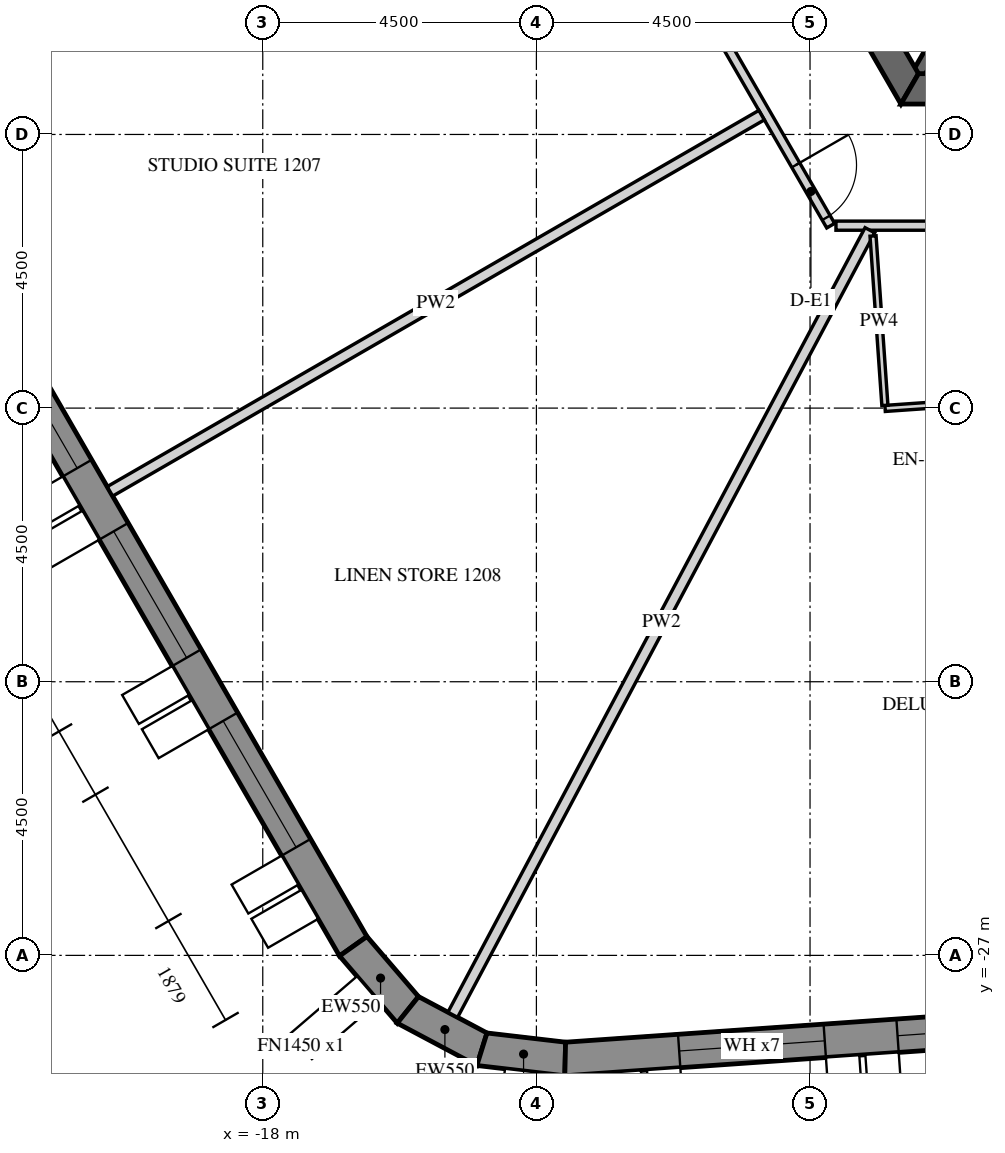
"""IFC4 building model, lengths in metres.
Left out: names, types, materials, properties, quantities, classifications, styles, units other than length and angle.
Written with IfcOpenShell. Run it as: python <this file> out.ifc"""

import sys

from ifc_helpers import new_model, si_unit, direction, frame, frame_2d, origin, place, context, subcontext, project, spatial, polyline, rectangle, outline, extrude, element, fill, save


model = new_model("IFC4")
c1 = context("Model", 3, precision=1e-05, world=origin(), true_north=direction((0.0, 1.0)))
c2 = subcontext(c1, "Body", "Model", "MODEL_VIEW")
j1 = project(units=[si_unit("LENGTHUNIT", "METRE"), si_unit("PLANEANGLEUNIT", "RADIAN")], contexts=[c1])
p1 = place(None, origin())
s1 = spatial("IfcSite", under=j1, at=p1, CompositionType="ELEMENT")
p2 = place(p1, origin())
s2 = spatial("IfcBuilding", under=s1, at=p2, CompositionType="ELEMENT")
p3 = place(p2, frame((0.0, 0.0, 164.4)))
s3 = spatial("IfcBuildingStorey", under=s2, at=p3, CompositionType="ELEMENT", Elevation=164.4)
p4 = place(p3, frame((-30.391, -2.811, -0.15), z_axis=(0.0, 0.0, 1.0), x_axis=(0.499998569178, -0.866026229868, 0.0)))
e1 = element("IfcWall", 1, at=p4, inside=s3, PredefinedType="SOLIDWALL", context=c2, shape_type="SweptSolid", body=[
    extrude(outline(polyline([(-0.022, -0.275), (27.783, -0.275), (27.732, 0.275), (0.022, 0.275), (-0.022, -0.275)])), origin(), (0.0, 0.0, 1.0), 3.9),
])
p5 = place(p4, frame((1.879, 0.0, 1.05)))
e2 = element("IfcOpeningElement", 2, at=p5, cuts=e1, PredefinedType="OPENING", context=c2, shape_type="SweptSolid", body=[
    extrude(rectangle(XDim=2.4, YDim=2.4, at=frame_2d((1.2, 1.2))), frame((0.0, 0.285, 0.0), z_axis=(0.0, -1.0, 0.0), x_axis=(1.0, 0.0, 0.0)), (0.0, 0.0, 1.0), 0.57),
])
p6 = place(p4, frame((5.479, 0.0, 1.05)))
e3 = element("IfcOpeningElement", 3, at=p6, cuts=e1, PredefinedType="OPENING", context=c2, shape_type="SweptSolid", body=[
    extrude(rectangle(XDim=2.4, YDim=2.4, at=frame_2d((1.2, 1.2))), frame((0.0, 0.285, 0.0), z_axis=(0.0, -1.0, 0.0), x_axis=(1.0, 0.0, 0.0)), (0.0, 0.0, 1.0), 0.57),
])
p7 = place(p4, frame((9.079, 0.0, 1.05)))
e4 = element("IfcOpeningElement", 4, at=p7, cuts=e1, PredefinedType="OPENING", context=c2, shape_type="SweptSolid", body=[
    extrude(rectangle(XDim=2.4, YDim=2.4, at=frame_2d((1.2, 1.2))), frame((0.0, 0.285, 0.0), z_axis=(0.0, -1.0, 0.0), x_axis=(1.0, 0.0, 0.0)), (0.0, 0.0, 1.0), 0.57),
])
p8 = place(p4, frame((12.679, 0.0, 1.05)))
e5 = element("IfcOpeningElement", 5, at=p8, cuts=e1, PredefinedType="OPENING", context=c2, shape_type="SweptSolid", body=[
    extrude(rectangle(XDim=2.4, YDim=2.4, at=frame_2d((1.2, 1.2))), frame((0.0, 0.285, 0.0), z_axis=(0.0, -1.0, 0.0), x_axis=(1.0, 0.0, 0.0)), (0.0, 0.0, 1.0), 0.57),
])
p9 = place(p4, frame((16.279, 0.0, 1.05)))
e6 = element("IfcOpeningElement", 6, at=p9, cuts=e1, PredefinedType="OPENING", context=c2, shape_type="SweptSolid", body=[
    extrude(rectangle(XDim=2.4, YDim=2.4, at=frame_2d((1.2, 1.2))), frame((0.0, 0.285, 0.0), z_axis=(0.0, -1.0, 0.0), x_axis=(1.0, 0.0, 0.0)), (0.0, 0.0, 1.0), 0.57),
])
p10 = place(p4, frame((19.879, 0.0, 1.05)))
e7 = element("IfcOpeningElement", 7, at=p10, cuts=e1, PredefinedType="OPENING", context=c2, shape_type="SweptSolid", body=[
    extrude(rectangle(XDim=2.4, YDim=2.4, at=frame_2d((1.2, 1.2))), frame((0.0, 0.285, 0.0), z_axis=(0.0, -1.0, 0.0), x_axis=(1.0, 0.0, 0.0)), (0.0, 0.0, 1.0), 0.57),
])
p11 = place(p4, frame((23.479, 0.0, 1.05)))
e8 = element("IfcOpeningElement", 8, at=p11, cuts=e1, PredefinedType="OPENING", context=c2, shape_type="SweptSolid", body=[
    extrude(rectangle(XDim=2.4, YDim=2.4, at=frame_2d((1.2, 1.2))), frame((0.0, 0.285, 0.0), z_axis=(0.0, -1.0, 0.0), x_axis=(1.0, 0.0, 0.0)), (0.0, 0.0, 1.0), 0.57),
])
p12 = place(p3, frame((-16.512, -26.85, -0.15), z_axis=(0.0, 0.0, 1.0), x_axis=(0.651621950847, -0.758543890078, 0.0)))
e9 = element("IfcWall", 9, at=p12, inside=s3, PredefinedType="SOLIDWALL", context=c2, shape_type="SweptSolid", body=[
    extrude(outline(polyline([(-0.026, -0.275), (1.431, -0.275), (1.327, 0.275), (0.026, 0.275), (-0.026, -0.275)])), origin(), (0.0, 0.0, 1.0), 3.9),
])
p13 = place(p3, frame((-15.614, -27.896, -0.15), z_axis=(0.0, 0.0, 1.0), x_axis=(0.882994189209, -0.469383917304, 0.0)))
e10 = element("IfcWall", 10, at=p13, inside=s3, PredefinedType="SOLIDWALL", context=c2, shape_type="SweptSolid", body=[
    extrude(outline(polyline([(-0.052, -0.275), (1.431, -0.275), (1.327, 0.275), (0.052, 0.275), (-0.052, -0.275)])), origin(), (0.0, 0.0, 1.0), 3.9),
])
p14 = place(p3, frame((-14.396, -28.543, -0.15), z_axis=(0.0, 0.0, 1.0), x_axis=(0.993232537394, -0.11614269956, 0.0)))
e11 = element("IfcWall", 11, at=p14, inside=s3, PredefinedType="SOLIDWALL", context=c2, shape_type="SweptSolid", body=[
    extrude(outline(polyline([(-0.052, -0.275), (1.405, -0.275), (1.353, 0.275), (0.052, 0.275), (-0.052, -0.275)])), origin(), (0.0, 0.0, 1.0), 3.9),
])
p15 = place(p3, frame((-13.026, -28.704, -0.15), z_axis=(0.0, 0.0, 1.0), x_axis=(0.99756406806, 0.069756219185, 0.0)))
e12 = element("IfcWall", 12, at=p15, inside=s3, PredefinedType="SOLIDWALL", context=c2, shape_type="SweptSolid", body=[
    extrude(outline(polyline([(-0.026, -0.275), (27.78, -0.275), (27.735, 0.275), (0.026, 0.275), (-0.026, -0.275)])), origin(), (0.0, 0.0, 1.0), 3.9),
])
p16 = place(p15, frame((1.879, 0.0, 1.05)))
e13 = element("IfcOpeningElement", 13, at=p16, cuts=e12, PredefinedType="OPENING", context=c2, shape_type="SweptSolid", body=[
    extrude(rectangle(XDim=2.4, YDim=2.4, at=frame_2d((1.2, 1.2))), frame((0.0, 0.285, 0.0), z_axis=(0.0, -1.0, 0.0), x_axis=(1.0, 0.0, 0.0)), (0.0, 0.0, 1.0), 0.57),
])
p17 = place(p15, frame((5.479, 0.0, 1.05)))
e14 = element("IfcOpeningElement", 14, at=p17, cuts=e12, PredefinedType="OPENING", context=c2, shape_type="SweptSolid", body=[
    extrude(rectangle(XDim=2.4, YDim=2.4, at=frame_2d((1.2, 1.2))), frame((0.0, 0.285, 0.0), z_axis=(0.0, -1.0, 0.0), x_axis=(1.0, 0.0, 0.0)), (0.0, 0.0, 1.0), 0.57),
])
p18 = place(p15, frame((9.079, 0.0, 1.05)))
e15 = element("IfcOpeningElement", 15, at=p18, cuts=e12, PredefinedType="OPENING", context=c2, shape_type="SweptSolid", body=[
    extrude(rectangle(XDim=2.4, YDim=2.4, at=frame_2d((1.2, 1.2))), frame((0.0, 0.285, 0.0), z_axis=(0.0, -1.0, 0.0), x_axis=(1.0, 0.0, 0.0)), (0.0, 0.0, 1.0), 0.57),
])
p19 = place(p15, frame((12.679, 0.0, 1.05)))
e16 = element("IfcOpeningElement", 16, at=p19, cuts=e12, PredefinedType="OPENING", context=c2, shape_type="SweptSolid", body=[
    extrude(rectangle(XDim=2.4, YDim=2.4, at=frame_2d((1.2, 1.2))), frame((0.0, 0.285, 0.0), z_axis=(0.0, -1.0, 0.0), x_axis=(1.0, 0.0, 0.0)), (0.0, 0.0, 1.0), 0.57),
])
p20 = place(p15, frame((16.279, 0.0, 1.05)))
e17 = element("IfcOpeningElement", 17, at=p20, cuts=e12, PredefinedType="OPENING", context=c2, shape_type="SweptSolid", body=[
    extrude(rectangle(XDim=2.4, YDim=2.4, at=frame_2d((1.2, 1.2))), frame((0.0, 0.285, 0.0), z_axis=(0.0, -1.0, 0.0), x_axis=(1.0, 0.0, 0.0)), (0.0, 0.0, 1.0), 0.57),
])
p21 = place(p15, frame((19.879, 0.0, 1.05)))
e18 = element("IfcOpeningElement", 18, at=p21, cuts=e12, PredefinedType="OPENING", context=c2, shape_type="SweptSolid", body=[
    extrude(rectangle(XDim=2.4, YDim=2.4, at=frame_2d((1.2, 1.2))), frame((0.0, 0.285, 0.0), z_axis=(0.0, -1.0, 0.0), x_axis=(1.0, 0.0, 0.0)), (0.0, 0.0, 1.0), 0.57),
])
p22 = place(p15, frame((23.479, 0.0, 1.05)))
e19 = element("IfcOpeningElement", 19, at=p22, cuts=e12, PredefinedType="OPENING", context=c2, shape_type="SweptSolid", body=[
    extrude(rectangle(XDim=2.4, YDim=2.4, at=frame_2d((1.2, 1.2))), frame((0.0, 0.285, 0.0), z_axis=(0.0, -1.0, 0.0), x_axis=(1.0, 0.0, 0.0)), (0.0, 0.0, 1.0), 0.57),
])
p23 = place(p3, frame((-14.722, 0.0, -0.15), z_axis=(0.0, 0.0, 1.0), x_axis=(0.50000571537, -0.866022103989, 0.0)))
e20 = element("IfcWall", 20, at=p23, inside=s3, PredefinedType="SHEAR", context=c2, shape_type="SweptSolid", body=[
    extrude(outline(polyline([(-0.144, -0.25), (14.867, -0.25), (14.578, 0.25), (0.144, 0.25), (-0.144, -0.25)])), origin(), (0.0, 0.0, 1.0), 3.9),
])
p24 = place(p23, frame((6.432, 0.0, 0.15)))
e21 = element("IfcOpeningElement", 21, at=p24, cuts=e20, PredefinedType="OPENING", context=c2, shape_type="SweptSolid", body=[
    extrude(rectangle(XDim=1.8, YDim=2.4, at=frame_2d((0.9, 1.2))), frame((0.0, 0.26, 0.0), z_axis=(0.0, -1.0, 0.0), x_axis=(1.0, 0.0, 0.0)), (0.0, 0.0, 1.0), 0.52),
])
p25 = place(p3, frame((-7.361, -12.75, -0.15), z_axis=(0.0, 0.0, 1.0), x_axis=(1.0, 0.0, 0.0)))
e22 = element("IfcWall", 22, at=p25, inside=s3, PredefinedType="SHEAR", context=c2, shape_type="SweptSolid", body=[
    extrude(outline(polyline([(-0.144, -0.25), (14.866, -0.25), (14.578, 0.25), (0.144, 0.25), (-0.144, -0.25)])), origin(), (0.0, 0.0, 1.0), 3.9),
])
p26 = place(p25, frame((6.761, 0.0, 0.15)))
e23 = element("IfcOpeningElement", 23, at=p26, cuts=e22, PredefinedType="OPENING", context=c2, shape_type="SweptSolid", body=[
    extrude(rectangle(XDim=1.2, YDim=2.4, at=frame_2d((0.6, 1.2))), frame((0.0, 0.26, 0.0), z_axis=(0.0, -1.0, 0.0), x_axis=(1.0, 0.0, 0.0)), (0.0, 0.0, 1.0), 0.52),
])
p27 = place(p3, frame((-5.773, -10.0, -0.15), z_axis=(0.0, 0.0, 1.0), x_axis=(-0.499995765644, -0.866027848477, 0.0)))
e24 = element("IfcWall", 24, at=p27, inside=s3, PredefinedType="SHEAR", context=c2, shape_type="SweptSolid", body=[
    extrude(rectangle(XDim=2.887, YDim=0.2, at=frame_2d((1.443, 0.0))), origin(), (0.0, 0.0, 1.0), 3.9),
])
p28 = place(p3, frame((-16.094, -2.125, 0.0), z_axis=(0.0, 0.0, 1.0), x_axis=(0.500010545262, -0.866019315389, 0.0)))
e25 = element("IfcWall", 25, at=p28, inside=s3, PredefinedType="PARTITIONING", context=c2, shape_type="SweptSolid", body=[
    extrude(rectangle(XDim=14.867, YDim=0.15, at=frame_2d((7.434, 0.0))), origin(), (0.0, 0.0, 1.0), 2.988),
])
p29 = place(p28, frame((3.619, 0.0, 0.0)))
e26 = element("IfcOpeningElement", 26, at=p29, cuts=e25, PredefinedType="OPENING", context=c2, shape_type="SweptSolid", body=[
    extrude(rectangle(XDim=1.0, YDim=2.1, at=frame_2d((0.5, 1.05))), frame((0.0, 0.085, 0.0), z_axis=(0.0, -1.0, 0.0), x_axis=(1.0, 0.0, 0.0)), (0.0, 0.0, 1.0), 0.17),
])
p30 = place(p28, frame((9.924, 0.0, 0.0)))
e27 = element("IfcOpeningElement", 27, at=p30, cuts=e25, PredefinedType="OPENING", context=c2, shape_type="SweptSolid", body=[
    extrude(rectangle(XDim=1.0, YDim=2.1, at=frame_2d((0.5, 1.05))), frame((0.0, 0.085, 0.0), z_axis=(0.0, -1.0, 0.0), x_axis=(1.0, 0.0, 0.0)), (0.0, 0.0, 1.0), 0.17),
])
p31 = place(p28, frame((13.717, 0.0, 0.0)))
e28 = element("IfcOpeningElement", 28, at=p31, cuts=e25, PredefinedType="OPENING", context=c2, shape_type="SweptSolid", body=[
    extrude(rectangle(XDim=1.0, YDim=2.1, at=frame_2d((0.5, 1.05))), frame((0.0, 0.085, 0.0), z_axis=(0.0, -1.0, 0.0), x_axis=(1.0, 0.0, 0.0)), (0.0, 0.0, 1.0), 0.17),
])
p32 = place(p3, frame((-8.574, -15.0, 0.0), z_axis=(0.0, 0.0, 1.0), x_axis=(1.0, 0.0, 0.0)))
e29 = element("IfcWall", 29, at=p32, inside=s3, PredefinedType="PARTITIONING", context=c2, shape_type="SweptSolid", body=[
    extrude(rectangle(XDim=14.78, YDim=0.15, at=frame_2d((7.39, 0.0))), origin(), (0.0, 0.0, 1.0), 2.988),
])
p33 = place(p32, frame((4.445, 0.0, 0.0)))
e30 = element("IfcOpeningElement", 30, at=p33, cuts=e29, PredefinedType="OPENING", context=c2, shape_type="SweptSolid", body=[
    extrude(rectangle(XDim=1.0, YDim=2.1, at=frame_2d((0.5, 1.05))), frame((0.0, 0.085, 0.0), z_axis=(0.0, -1.0, 0.0), x_axis=(1.0, 0.0, 0.0)), (0.0, 0.0, 1.0), 0.17),
])
p34 = place(p32, frame((8.885, 0.0, 0.0)))
e31 = element("IfcOpeningElement", 31, at=p34, cuts=e29, PredefinedType="OPENING", context=c2, shape_type="SweptSolid", body=[
    extrude(rectangle(XDim=1.0, YDim=2.1, at=frame_2d((0.5, 1.05))), frame((0.0, 0.085, 0.0), z_axis=(0.0, -1.0, 0.0), x_axis=(1.0, 0.0, 0.0)), (0.0, 0.0, 1.0), 0.17),
])
for number, where, z_axis, x_axis in (
    (32, (-24.114, -13.134, 0.0), (0.0, 0.0, 1.0), (0.866, 0.5, 0.0)),
    (33, (-20.513, -19.37, 0.0), (0.0, 0.0, 1.0), (0.866, 0.5, 0.0)),
):
    element("IfcWall", number, at=place(p3, frame(where, z_axis=z_axis, x_axis=x_axis)), inside=s3, PredefinedType="PARTITIONING", context=c2, shape_type="SweptSolid", body=[
        extrude(rectangle(XDim=12.375, YDim=0.18, at=frame_2d((6.188, 0.0))), origin(), (0.0, 0.0, 1.0), 2.988),
    ])
p35 = place(p3, frame((-14.876, -27.977, 0.0), z_axis=(0.0, 0.0, 1.0), x_axis=(0.469468328163, 0.882949312731, 0.0)))
e34 = element("IfcWall", 34, at=p35, inside=s3, PredefinedType="PARTITIONING", context=c2, shape_type="SweptSolid", body=[
    extrude(rectangle(XDim=14.613, YDim=0.18, at=frame_2d((7.306, 0.0))), origin(), (0.0, 0.0, 1.0), 2.988),
])
p36 = place(p3, frame((-5.222, -17.828, 0.0), z_axis=(0.0, 0.0, 1.0), x_axis=(-0.997567829494, -0.069702407128, 0.0)))
e35 = element("IfcWall", 35, at=p36, inside=s3, PredefinedType="PARTITIONING", context=c2, shape_type="SweptSolid", body=[
    extrude(rectangle(XDim=2.55, YDim=0.1, at=frame_2d((1.275, 0.0))), origin(), (0.0, 0.0, 1.0), 2.988),
])
p37 = place(p3, frame((-7.769, -17.956, 0.0), z_axis=(0.0, 0.0, 1.0), x_axis=(-0.069756058123, 0.997564079323, 0.0)))
e36 = element("IfcWall", 36, at=p37, inside=s3, PredefinedType="PARTITIONING", context=c2, shape_type="SweptSolid", body=[
    extrude(rectangle(XDim=2.793, YDim=0.1, at=frame_2d((1.396, 0.0))), origin(), (0.0, 0.0, 1.0), 2.988),
])
p38 = place(p9, frame((0.0, 0.205, 0.0)))
e37 = element("IfcWindow", 37, at=p38, inside=s3, PartitioningType="DOUBLE_PANEL_VERTICAL", PredefinedType="WINDOW", context=c2, shape_type="SweptSolid", body=[
    extrude(rectangle(XDim=2.4, YDim=2.4, at=frame_2d((1.2, 1.2))), frame((0.0, 0.03, 0.0), z_axis=(0.0, -1.0, 0.0), x_axis=(1.0, 0.0, 0.0)), (0.0, 0.0, 1.0), 0.06),
])
fill(e6, e37)
p39 = place(p10, frame((0.0, 0.205, 0.0)))
e38 = element("IfcWindow", 38, at=p39, inside=s3, PartitioningType="DOUBLE_PANEL_VERTICAL", PredefinedType="WINDOW", context=c2, shape_type="SweptSolid", body=[
    extrude(rectangle(XDim=2.4, YDim=2.4, at=frame_2d((1.2, 1.2))), frame((0.0, 0.03, 0.0), z_axis=(0.0, -1.0, 0.0), x_axis=(1.0, 0.0, 0.0)), (0.0, 0.0, 1.0), 0.06),
])
fill(e7, e38)
p40 = place(p11, frame((0.0, 0.205, 0.0)))
e39 = element("IfcWindow", 39, at=p40, inside=s3, PartitioningType="DOUBLE_PANEL_VERTICAL", PredefinedType="WINDOW", context=c2, shape_type="SweptSolid", body=[
    extrude(rectangle(XDim=2.4, YDim=2.4, at=frame_2d((1.2, 1.2))), frame((0.0, 0.03, 0.0), z_axis=(0.0, -1.0, 0.0), x_axis=(1.0, 0.0, 0.0)), (0.0, 0.0, 1.0), 0.06),
])
fill(e8, e39)
p41 = place(p16, frame((0.0, 0.205, 0.0)))
e40 = element("IfcWindow", 40, at=p41, inside=s3, PartitioningType="DOUBLE_PANEL_VERTICAL", PredefinedType="WINDOW", context=c2, shape_type="SweptSolid", body=[
    extrude(rectangle(XDim=2.4, YDim=2.4, at=frame_2d((1.2, 1.2))), frame((0.0, 0.03, 0.0), z_axis=(0.0, -1.0, 0.0), x_axis=(1.0, 0.0, 0.0)), (0.0, 0.0, 1.0), 0.06),
])
fill(e13, e40)
p42 = place(p17, frame((0.0, 0.205, 0.0)))
e41 = element("IfcWindow", 41, at=p42, inside=s3, PartitioningType="DOUBLE_PANEL_VERTICAL", PredefinedType="WINDOW", context=c2, shape_type="SweptSolid", body=[
    extrude(rectangle(XDim=2.4, YDim=2.4, at=frame_2d((1.2, 1.2))), frame((0.0, 0.03, 0.0), z_axis=(0.0, -1.0, 0.0), x_axis=(1.0, 0.0, 0.0)), (0.0, 0.0, 1.0), 0.06),
])
fill(e14, e41)
p43 = place(p31, origin())
e42 = element("IfcDoor", 42, at=p43, inside=s3, OperationType="SINGLE_SWING_LEFT", PredefinedType="DOOR", context=c2, shape_type="SweptSolid", body=[
    extrude(rectangle(XDim=1.0, YDim=2.1, at=frame_2d((0.5, 1.05))), frame((0.0, 0.025, 0.0), z_axis=(0.0, -1.0, 0.0), x_axis=(1.0, 0.0, 0.0)), (0.0, 0.0, 1.0), 0.05),
])
fill(e28, e42)
save(model, sys.argv[1])
